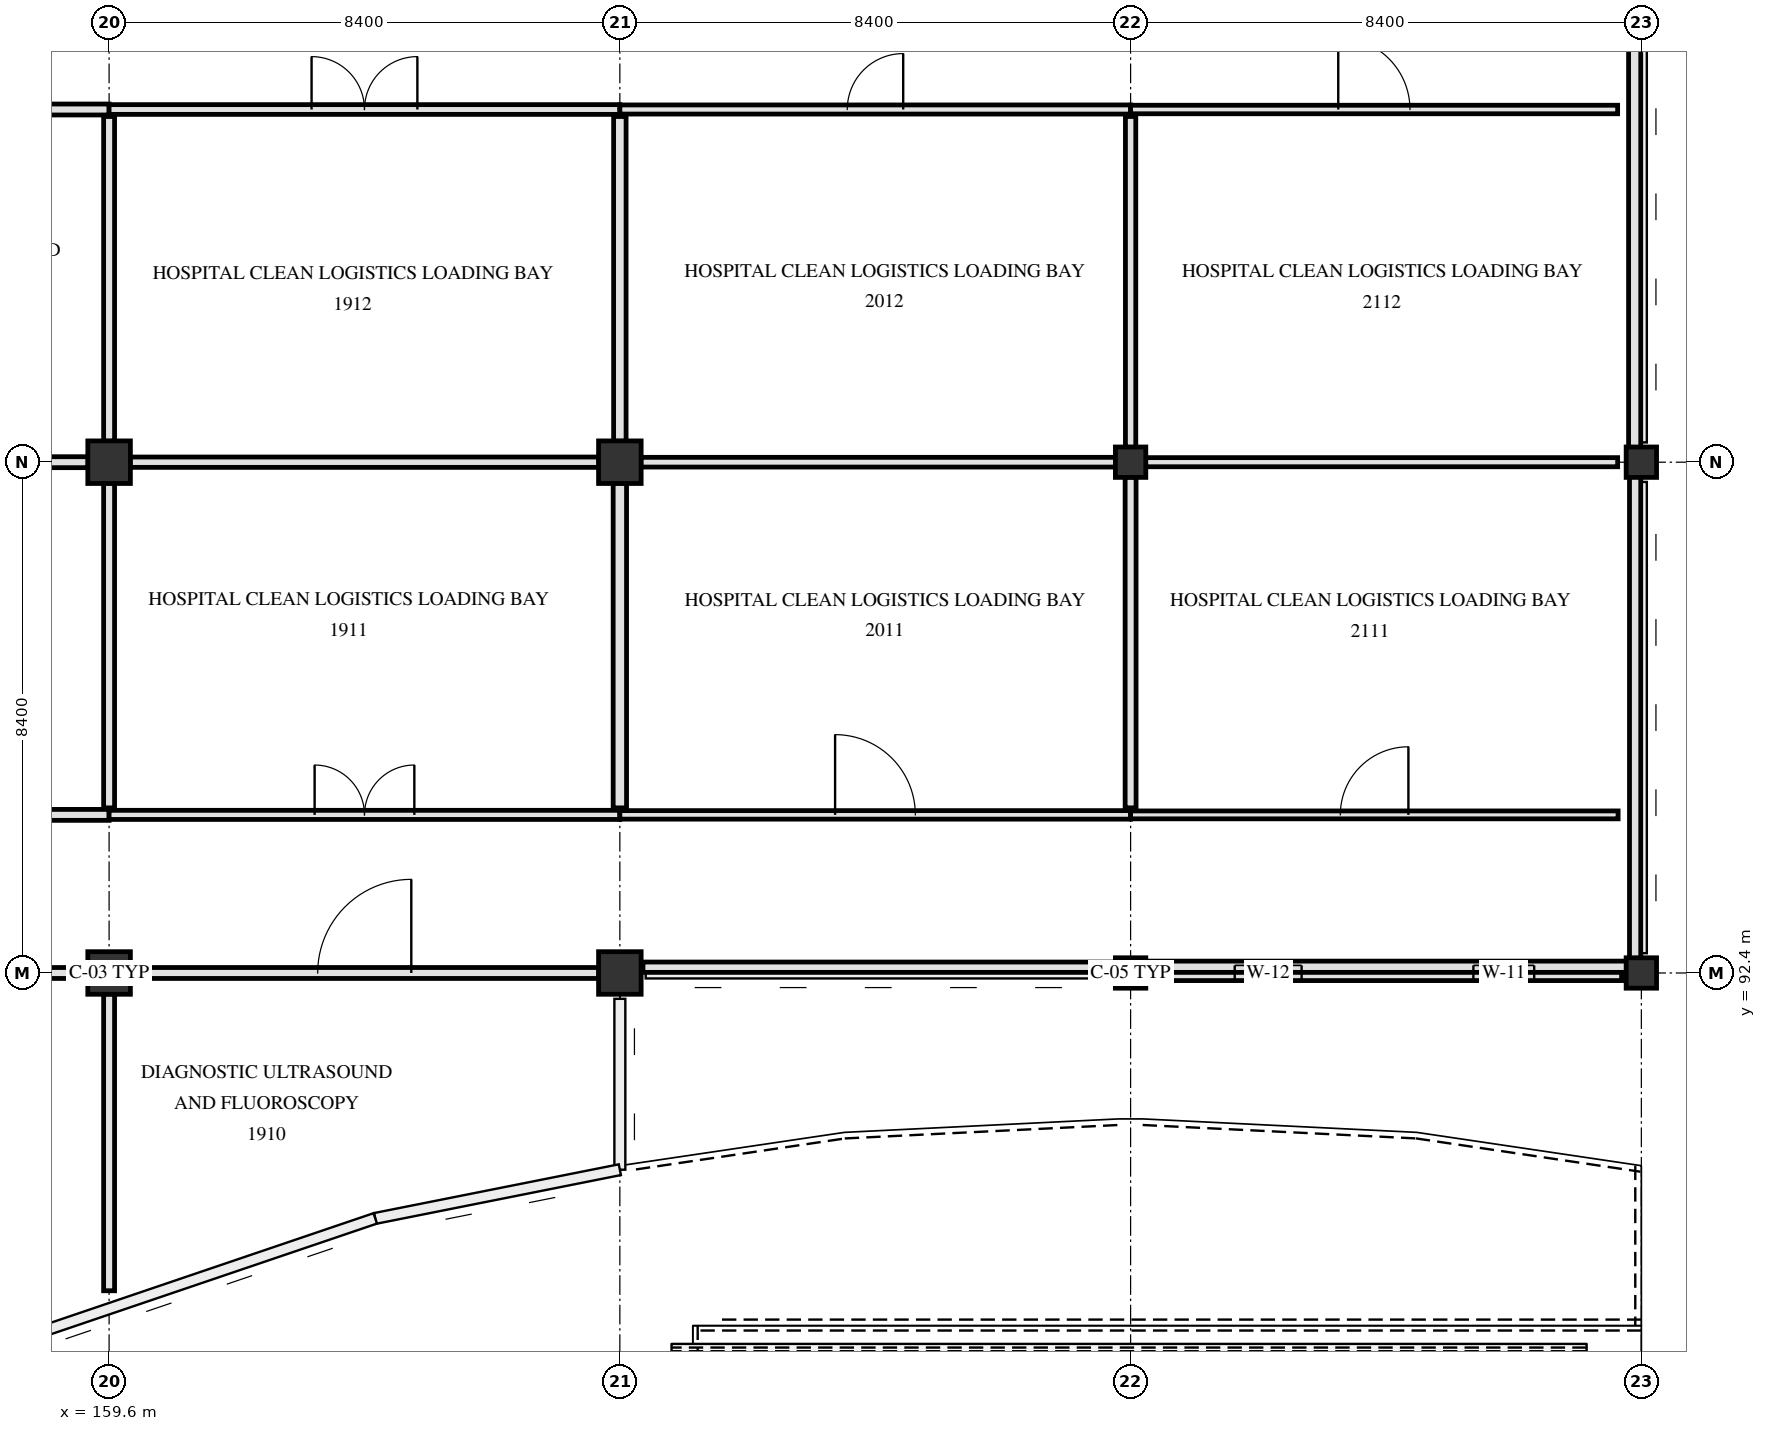
"""IFC4 building model, lengths in metres.
Left out: names, types, materials, properties, quantities, classifications, styles, units other than length and angle.
Written with IfcOpenShell. Run it as: python <this file> out.ifc"""

import sys

from ifc_helpers import new_model, si_unit, direction, frame, frame_2d, origin, origin_2d, place, context, subcontext, project, spatial, rectangle, extrude, element, fill, save


model = new_model("IFC4")
c1 = context("Model", 3, precision=1e-05, world=origin(), true_north=direction((0.0, 1.0)))
c2 = subcontext(c1, "Body", "Model", "MODEL_VIEW")
j1 = project(units=[si_unit("LENGTHUNIT", "METRE"), si_unit("PLANEANGLEUNIT", "RADIAN")], contexts=[c1])
p1 = place(None, origin())
s1 = spatial("IfcSite", under=j1, at=p1, CompositionType="ELEMENT")
p2 = place(p1, origin())
s2 = spatial("IfcBuilding", under=s1, at=p2, CompositionType="ELEMENT")
p3 = place(p2, origin())
s3 = spatial("IfcBuildingStorey", under=s2, at=p3, CompositionType="ELEMENT", Elevation=0.0)
for number, where, z_axis, x_axis in (
    (1, (159.6, 92.4, 0.0), (0.0, 0.0, 1.0), (1.0, 0.0, 0.0)),
    (2, (159.6, 100.8, 0.0), (0.0, 0.0, 1.0), (1.0, 0.0, 0.0)),
    (3, (168.0, 92.4, 0.0), (0.0, 0.0, 1.0), (1.0, 0.0, 0.0)),
    (4, (168.0, 100.8, 0.0), (0.0, 0.0, 1.0), (1.0, 0.0, 0.0)),
):
    element("IfcColumn", number, at=place(p3, frame(where, z_axis=z_axis, x_axis=x_axis)), inside=s3, PredefinedType="COLUMN", context=c2, shape_type="SweptSolid", body=[
        extrude(rectangle(XDim=0.7, YDim=0.7, at=origin_2d()), origin(), (0.0, 0.0, 1.0), 4.8),
    ])
for number, where, z_axis, x_axis in (
    (5, (176.4, 92.4, 0.0), (0.0, 0.0, 1.0), (1.0, 0.0, 0.0)),
    (6, (176.4, 100.8, 0.0), (0.0, 0.0, 1.0), (1.0, 0.0, 0.0)),
    (7, (184.8, 92.4, 0.0), (0.0, 0.0, 1.0), (1.0, 0.0, 0.0)),
    (8, (184.8, 100.8, 0.0), (0.0, 0.0, 1.0), (1.0, 0.0, 0.0)),
):
    element("IfcColumn", number, at=place(p3, frame(where, z_axis=z_axis, x_axis=x_axis)), inside=s3, PredefinedType="COLUMN", context=c2, shape_type="SweptSolid", body=[
        extrude(rectangle(XDim=0.5, YDim=0.5, at=origin_2d()), origin(), (0.0, 0.0, 1.0), 4.8),
    ])
p4 = place(p3, frame((184.475, 92.4, 0.0), z_axis=(0.0, 0.0, 1.0), x_axis=(-1.0, 0.0, 0.0)))
e9 = element("IfcWall", 9, at=p4, inside=s3, PredefinedType="SOLIDWALL", context=c2, shape_type="SweptSolid", body=[
    extrude(rectangle(XDim=7.75, YDim=0.25, at=frame_2d((3.875, 0.0))), origin(), (0.0, 0.0, 1.0), 3.79),
])
p5 = place(p4, frame((1.438, 0.0, 0.85)))
e10 = element("IfcOpeningElement", 10, at=p5, cuts=e9, PredefinedType="OPENING", context=c2, shape_type="SweptSolid", body=[
    extrude(rectangle(XDim=1.0, YDim=1.42, at=frame_2d((0.5, 0.71))), frame((0.0, 0.135, 0.0), z_axis=(0.0, -1.0, 0.0), x_axis=(1.0, 0.0, 0.0)), (0.0, 0.0, 1.0), 0.27),
])
p6 = place(p4, frame((5.262, 0.0, 0.85)))
e11 = element("IfcOpeningElement", 11, at=p6, cuts=e9, PredefinedType="OPENING", context=c2, shape_type="SweptSolid", body=[
    extrude(rectangle(XDim=1.1, YDim=1.42, at=frame_2d((0.55, 0.71))), frame((0.0, 0.135, 0.0), z_axis=(0.0, -1.0, 0.0), x_axis=(1.0, 0.0, 0.0)), (0.0, 0.0, 1.0), 0.27),
])
p7 = place(p3, frame((184.8, 92.502, 4.78), z_axis=(0.0, 0.0, 1.0), x_axis=(-1.0, 0.0, 0.0)))
e12 = element("IfcWall", 12, at=p7, inside=s3, PredefinedType="PARAPET", context=c2, shape_type="SweptSolid", body=[
    extrude(rectangle(XDim=8.4, YDim=0.185, at=frame_2d((4.2, 0.0))), origin(), (0.0, 0.0, 1.0), 1.17),
])
p8 = place(p3, frame((176.4, 92.495, 4.78), z_axis=(0.0, 0.0, 1.0), x_axis=(-1.0, 0.0, 0.0)))
e13 = element("IfcWall", 13, at=p8, inside=s3, PredefinedType="PARAPET", context=c2, shape_type="SweptSolid", body=[
    extrude(rectangle(XDim=8.02, YDim=0.17, at=frame_2d((4.01, 0.0))), origin(), (0.0, 0.0, 1.0), 1.17),
])
p9 = place(p3, frame((184.69, 109.2, 4.78), z_axis=(0.0, 0.0, 1.0), x_axis=(0.0, -1.0, 0.0)))
e14 = element("IfcWall", 14, at=p9, inside=s3, PredefinedType="PARAPET", context=c2, shape_type="SweptSolid", body=[
    extrude(rectangle(XDim=8.4, YDim=0.2, at=frame_2d((4.2, 0.0))), origin(), (0.0, 0.0, 1.0), 1.17),
])
p10 = place(p3, frame((184.698, 100.8, 4.78), z_axis=(0.0, 0.0, 1.0), x_axis=(0.0, -1.0, 0.0)))
e15 = element("IfcWall", 15, at=p10, inside=s3, PredefinedType="PARAPET", context=c2, shape_type="SweptSolid", body=[
    extrude(rectangle(XDim=8.4, YDim=0.185, at=frame_2d((4.2, 0.0))), origin(), (0.0, 0.0, 1.0), 1.17),
])
p11 = place(p3, frame((151.595, 92.4, 0.0), z_axis=(0.0, 0.0, 1.0), x_axis=(1.0, 0.0, 0.0)))
e16 = element("IfcWall", 16, at=p11, inside=s3, PredefinedType="PARTITIONING", context=c2, shape_type="SweptSolid", body=[
    extrude(rectangle(XDim=7.66, YDim=0.18, at=frame_2d((3.83, 0.0))), origin(), (0.0, 0.0, 1.0), 3.84),
])
p12 = place(p11, frame((3.355, 0.0, 0.0)))
e17 = element("IfcOpeningElement", 17, at=p12, cuts=e16, PredefinedType="OPENING", context=c2, shape_type="SweptSolid", body=[
    extrude(rectangle(XDim=0.95, YDim=2.1, at=frame_2d((0.475, 1.05))), frame((0.0, 0.1, 0.0), z_axis=(0.0, -1.0, 0.0), x_axis=(1.0, 0.0, 0.0)), (0.0, 0.0, 1.0), 0.2),
])
p13 = place(p3, frame((159.945, 92.4, 0.0), z_axis=(0.0, 0.0, 1.0), x_axis=(1.0, 0.0, 0.0)))
e18 = element("IfcWall", 18, at=p13, inside=s3, PredefinedType="PARTITIONING", context=c2, shape_type="SweptSolid", body=[
    extrude(rectangle(XDim=7.71, YDim=0.18, at=frame_2d((3.855, 0.0))), origin(), (0.0, 0.0, 1.0), 3.84),
])
p14 = place(p13, frame((3.085, 0.0, 0.0)))
e19 = element("IfcOpeningElement", 19, at=p14, cuts=e18, PredefinedType="OPENING", context=c2, shape_type="SweptSolid", body=[
    extrude(rectangle(XDim=1.54, YDim=2.24, at=frame_2d((0.77, 1.12))), frame((0.0, 0.1, 0.0), z_axis=(0.0, -1.0, 0.0), x_axis=(1.0, 0.0, 0.0)), (0.0, 0.0, 1.0), 0.2),
])
p15 = place(p3, frame((151.2, 95.0, 0.0), z_axis=(0.0, 0.0, 1.0), x_axis=(1.0, 0.0, 0.0)))
e20 = element("IfcWall", 20, at=p15, inside=s3, PredefinedType="PARTITIONING", context=c2, shape_type="SweptSolid", body=[
    extrude(rectangle(XDim=8.4, YDim=0.18, at=frame_2d((4.2, 0.0))), origin(), (0.0, 0.0, 1.0), 3.89),
])
p16 = place(p15, frame((3.65, 0.0, 0.0)))
e21 = element("IfcOpeningElement", 21, at=p16, cuts=e20, PredefinedType="OPENING", context=c2, shape_type="SweptSolid", body=[
    extrude(rectangle(XDim=1.1, YDim=2.15, at=frame_2d((0.55, 1.075))), frame((0.0, 0.1, 0.0), z_axis=(0.0, -1.0, 0.0), x_axis=(1.0, 0.0, 0.0)), (0.0, 0.0, 1.0), 0.2),
])
p17 = place(p3, frame((159.6, 95.0, 0.0), z_axis=(0.0, 0.0, 1.0), x_axis=(1.0, 0.0, 0.0)))
e22 = element("IfcWall", 22, at=p17, inside=s3, PredefinedType="PARTITIONING", context=c2, shape_type="SweptSolid", body=[
    extrude(rectangle(XDim=8.4, YDim=0.15, at=frame_2d((4.2, 0.0))), origin(), (0.0, 0.0, 1.0), 3.89),
])
p18 = place(p17, frame((3.38, 0.0, 0.0)))
e23 = element("IfcOpeningElement", 23, at=p18, cuts=e22, PredefinedType="OPENING", context=c2, shape_type="SweptSolid", body=[
    extrude(rectangle(XDim=1.64, YDim=2.28, at=frame_2d((0.82, 1.14))), frame((0.0, 0.085, 0.0), z_axis=(0.0, -1.0, 0.0), x_axis=(1.0, 0.0, 0.0)), (0.0, 0.0, 1.0), 0.17),
])
p19 = place(p3, frame((168.0, 95.0, 0.0), z_axis=(0.0, 0.0, 1.0), x_axis=(1.0, 0.0, 0.0)))
e24 = element("IfcWall", 24, at=p19, inside=s3, PredefinedType="PARTITIONING", context=c2, shape_type="SweptSolid", body=[
    extrude(rectangle(XDim=8.4, YDim=0.14, at=frame_2d((4.2, 0.0))), origin(), (0.0, 0.0, 1.0), 3.89),
])
p20 = place(p19, frame((3.54, 0.0, 0.0)))
e25 = element("IfcOpeningElement", 25, at=p20, cuts=e24, PredefinedType="OPENING", context=c2, shape_type="SweptSolid", body=[
    extrude(rectangle(XDim=1.32, YDim=2.18, at=frame_2d((0.66, 1.09))), frame((0.0, 0.08, 0.0), z_axis=(0.0, -1.0, 0.0), x_axis=(1.0, 0.0, 0.0)), (0.0, 0.0, 1.0), 0.16),
])
p21 = place(p3, frame((176.4, 95.0, 0.0), z_axis=(0.0, 0.0, 1.0), x_axis=(1.0, 0.0, 0.0)))
e26 = element("IfcWall", 26, at=p21, inside=s3, PredefinedType="PARTITIONING", context=c2, shape_type="SweptSolid", body=[
    extrude(rectangle(XDim=8.018, YDim=0.13, at=frame_2d((4.009, 0.0))), origin(), (0.0, 0.0, 1.0), 3.89),
])
p22 = place(p21, frame((3.449, 0.0, 0.0)))
e27 = element("IfcOpeningElement", 27, at=p22, cuts=e26, PredefinedType="OPENING", context=c2, shape_type="SweptSolid", body=[
    extrude(rectangle(XDim=1.12, YDim=2.18, at=frame_2d((0.56, 1.09))), frame((0.0, 0.075, 0.0), z_axis=(0.0, -1.0, 0.0), x_axis=(1.0, 0.0, 0.0)), (0.0, 0.0, 1.0), 0.15),
])
p23 = place(p3, frame((151.595, 100.8, 0.0), z_axis=(0.0, 0.0, 1.0), x_axis=(1.0, 0.0, 0.0)))
e28 = element("IfcWall", 28, at=p23, inside=s3, PredefinedType="PARTITIONING", context=c2, shape_type="SweptSolid", body=[
    extrude(rectangle(XDim=7.66, YDim=0.18, at=frame_2d((3.83, 0.0))), origin(), (0.0, 0.0, 1.0), 3.84),
])
p24 = place(p3, frame((159.945, 100.8, 0.0), z_axis=(0.0, 0.0, 1.0), x_axis=(1.0, 0.0, 0.0)))
e29 = element("IfcWall", 29, at=p24, inside=s3, PredefinedType="PARTITIONING", context=c2, shape_type="SweptSolid", body=[
    extrude(rectangle(XDim=7.71, YDim=0.17, at=frame_2d((3.855, 0.0))), origin(), (0.0, 0.0, 1.0), 3.84),
])
p25 = place(p3, frame((168.345, 100.8, 0.0), z_axis=(0.0, 0.0, 1.0), x_axis=(1.0, 0.0, 0.0)))
e30 = element("IfcWall", 30, at=p25, inside=s3, PredefinedType="PARTITIONING", context=c2, shape_type="SweptSolid", body=[
    extrude(rectangle(XDim=7.81, YDim=0.16, at=frame_2d((3.905, 0.0))), origin(), (0.0, 0.0, 1.0), 3.84),
])
p26 = place(p3, frame((176.645, 100.8, 0.0), z_axis=(0.0, 0.0, 1.0), x_axis=(1.0, 0.0, 0.0)))
e31 = element("IfcWall", 31, at=p26, inside=s3, PredefinedType="PARTITIONING", context=c2, shape_type="SweptSolid", body=[
    extrude(rectangle(XDim=7.765, YDim=0.15, at=frame_2d((3.882, 0.0))), origin(), (0.0, 0.0, 1.0), 3.84),
])
p27 = place(p3, frame((151.2, 106.6, 0.0), z_axis=(0.0, 0.0, 1.0), x_axis=(1.0, 0.0, 0.0)))
e32 = element("IfcWall", 32, at=p27, inside=s3, PredefinedType="PARTITIONING", context=c2, shape_type="SweptSolid", body=[
    extrude(rectangle(XDim=8.4, YDim=0.18, at=frame_2d((4.2, 0.0))), origin(), (0.0, 0.0, 1.0), 3.89),
])
p28 = place(p27, frame((3.625, 0.0, 0.0)))
e33 = element("IfcOpeningElement", 33, at=p28, cuts=e32, PredefinedType="OPENING", context=c2, shape_type="SweptSolid", body=[
    extrude(rectangle(XDim=1.15, YDim=2.15, at=frame_2d((0.575, 1.075))), frame((0.0, 0.1, 0.0), z_axis=(0.0, -1.0, 0.0), x_axis=(1.0, 0.0, 0.0)), (0.0, 0.0, 1.0), 0.2),
])
p29 = place(p3, frame((159.6, 106.6, 0.0), z_axis=(0.0, 0.0, 1.0), x_axis=(1.0, 0.0, 0.0)))
e34 = element("IfcWall", 34, at=p29, inside=s3, PredefinedType="PARTITIONING", context=c2, shape_type="SweptSolid", body=[
    extrude(rectangle(XDim=8.4, YDim=0.16, at=frame_2d((4.2, 0.0))), origin(), (0.0, 0.0, 1.0), 3.89),
])
p30 = place(p29, frame((3.33, 0.0, 0.0)))
e35 = element("IfcOpeningElement", 35, at=p30, cuts=e34, PredefinedType="OPENING", context=c2, shape_type="SweptSolid", body=[
    extrude(rectangle(XDim=1.74, YDim=2.24, at=frame_2d((0.87, 1.12))), frame((0.0, 0.09, 0.0), z_axis=(0.0, -1.0, 0.0), x_axis=(1.0, 0.0, 0.0)), (0.0, 0.0, 1.0), 0.18),
])
p31 = place(p3, frame((168.0, 106.6, 0.0), z_axis=(0.0, 0.0, 1.0), x_axis=(1.0, 0.0, 0.0)))
e36 = element("IfcWall", 36, at=p31, inside=s3, PredefinedType="PARTITIONING", context=c2, shape_type="SweptSolid", body=[
    extrude(rectangle(XDim=8.4, YDim=0.15, at=frame_2d((4.2, 0.0))), origin(), (0.0, 0.0, 1.0), 3.89),
])
p32 = place(p31, frame((3.74, 0.0, 0.0)))
e37 = element("IfcOpeningElement", 37, at=p32, cuts=e36, PredefinedType="OPENING", context=c2, shape_type="SweptSolid", body=[
    extrude(rectangle(XDim=0.92, YDim=2.08, at=frame_2d((0.46, 1.04))), frame((0.0, 0.085, 0.0), z_axis=(0.0, -1.0, 0.0), x_axis=(1.0, 0.0, 0.0)), (0.0, 0.0, 1.0), 0.17),
])
p33 = place(p3, frame((176.4, 106.6, 0.0), z_axis=(0.0, 0.0, 1.0), x_axis=(1.0, 0.0, 0.0)))
e38 = element("IfcWall", 38, at=p33, inside=s3, PredefinedType="PARTITIONING", context=c2, shape_type="SweptSolid", body=[
    extrude(rectangle(XDim=8.01, YDim=0.14, at=frame_2d((4.005, 0.0))), origin(), (0.0, 0.0, 1.0), 3.89),
])
p34 = place(p33, frame((3.415, 0.0, 0.0)))
e39 = element("IfcOpeningElement", 39, at=p34, cuts=e38, PredefinedType="OPENING", context=c2, shape_type="SweptSolid", body=[
    extrude(rectangle(XDim=1.18, YDim=2.18, at=frame_2d((0.59, 1.09))), frame((0.0, 0.08, 0.0), z_axis=(0.0, -1.0, 0.0), x_axis=(1.0, 0.0, 0.0)), (0.0, 0.0, 1.0), 0.16),
])
p35 = place(p3, frame((159.6, 87.174, 0.0), z_axis=(0.0, 0.0, 1.0), x_axis=(0.0, 1.0, 0.0)))
e40 = element("IfcWall", 40, at=p35, inside=s3, PredefinedType="PARTITIONING", context=c2, shape_type="SweptSolid", body=[
    extrude(rectangle(XDim=4.881, YDim=0.18, at=frame_2d((2.44, 0.0))), origin(), (0.0, 0.0, 1.0), 4.49),
])
for number, where, z_axis, x_axis in (
    (41, (159.6, 95.115, 0.0), (0.0, 0.0, 1.0), (0.0, 1.0, 0.0)),
    (42, (159.6, 101.145, 0.0), (0.0, 0.0, 1.0), (0.0, 1.0, 0.0)),
):
    element("IfcWall", number, at=place(p3, frame(where, z_axis=z_axis, x_axis=x_axis)), inside=s3, PredefinedType="PARTITIONING", context=c2, shape_type="SweptSolid", body=[
        extrude(rectangle(XDim=5.34, YDim=0.18, at=frame_2d((2.67, 0.0))), origin(), (0.0, 0.0, 1.0), 3.89),
    ])
p36 = place(p3, frame((168.0, 95.115, 0.0), z_axis=(0.0, 0.0, 1.0), x_axis=(0.0, 1.0, 0.0)))
e43 = element("IfcWall", 43, at=p36, inside=s3, PredefinedType="PARTITIONING", context=c2, shape_type="SweptSolid", body=[
    extrude(rectangle(XDim=5.34, YDim=0.22, at=frame_2d((2.67, 0.0))), origin(), (0.0, 0.0, 1.0), 3.89),
])
p37 = place(p3, frame((168.0, 101.145, 0.0), z_axis=(0.0, 0.0, 1.0), x_axis=(0.0, 1.0, 0.0)))
e44 = element("IfcWall", 44, at=p37, inside=s3, PredefinedType="PARTITIONING", context=c2, shape_type="SweptSolid", body=[
    extrude(rectangle(XDim=5.34, YDim=0.205, at=frame_2d((2.67, 0.0))), origin(), (0.0, 0.0, 1.0), 3.89),
])
p38 = place(p3, frame((176.4, 95.115, 0.0), z_axis=(0.0, 0.0, 1.0), x_axis=(0.0, 1.0, 0.0)))
e45 = element("IfcWall", 45, at=p38, inside=s3, PredefinedType="PARTITIONING", context=c2, shape_type="SweptSolid", body=[
    extrude(rectangle(XDim=5.44, YDim=0.18, at=frame_2d((2.72, 0.0))), origin(), (0.0, 0.0, 1.0), 3.89),
])
p39 = place(p3, frame((176.4, 101.045, 0.0), z_axis=(0.0, 0.0, 1.0), x_axis=(0.0, 1.0, 0.0)))
e46 = element("IfcWall", 46, at=p39, inside=s3, PredefinedType="PARTITIONING", context=c2, shape_type="SweptSolid", body=[
    extrude(rectangle(XDim=5.44, YDim=0.17, at=frame_2d((2.72, 0.0))), origin(), (0.0, 0.0, 1.0), 3.89),
])
p40 = place(p5, origin())
e47 = element("IfcWindow", 47, at=p40, inside=s3, PartitioningType="SINGLE_PANEL", PredefinedType="WINDOW", context=c2, shape_type="SweptSolid", body=[
    extrude(rectangle(XDim=1.0, YDim=1.42, at=frame_2d((0.5, 0.71))), frame((0.0, 0.03, 0.0), z_axis=(0.0, -1.0, 0.0), x_axis=(1.0, 0.0, 0.0)), (0.0, 0.0, 1.0), 0.06),
])
fill(e10, e47)
p41 = place(p6, origin())
e48 = element("IfcWindow", 48, at=p41, inside=s3, PartitioningType="SINGLE_PANEL", PredefinedType="WINDOW", context=c2, shape_type="SweptSolid", body=[
    extrude(rectangle(XDim=1.1, YDim=1.42, at=frame_2d((0.55, 0.71))), frame((0.0, 0.03, 0.0), z_axis=(0.0, -1.0, 0.0), x_axis=(1.0, 0.0, 0.0)), (0.0, 0.0, 1.0), 0.06),
])
fill(e11, e48)
p42 = place(p14, origin())
e49 = element("IfcDoor", 49, at=p42, inside=s3, OperationType="SINGLE_SWING_RIGHT", PredefinedType="DOOR", context=c2, shape_type="SweptSolid", body=[
    extrude(rectangle(XDim=1.54, YDim=2.24, at=frame_2d((0.77, 1.12))), frame((0.0, 0.025, 0.0), z_axis=(0.0, -1.0, 0.0), x_axis=(1.0, 0.0, 0.0)), (0.0, 0.0, 1.0), 0.05),
])
fill(e19, e49)
p43 = place(p18, origin())
e50 = element("IfcDoor", 50, at=p43, inside=s3, OperationType="DOUBLE_SWING_LEFT", PredefinedType="DOOR", context=c2, shape_type="SweptSolid", body=[
    extrude(rectangle(XDim=1.64, YDim=2.28, at=frame_2d((0.82, 1.14))), frame((0.0, 0.025, 0.0), z_axis=(0.0, -1.0, 0.0), x_axis=(1.0, 0.0, 0.0)), (0.0, 0.0, 1.0), 0.05),
])
fill(e23, e50)
p44 = place(p30, origin())
e51 = element("IfcDoor", 51, at=p44, inside=s3, OperationType="DOUBLE_SWING_RIGHT", PredefinedType="DOOR", context=c2, shape_type="SweptSolid", body=[
    extrude(rectangle(XDim=1.74, YDim=2.24, at=frame_2d((0.87, 1.12))), frame((0.0, 0.025, 0.0), z_axis=(0.0, -1.0, 0.0), x_axis=(1.0, 0.0, 0.0)), (0.0, 0.0, 1.0), 0.05),
])
fill(e35, e51)
p45 = place(p20, origin())
e52 = element("IfcDoor", 52, at=p45, inside=s3, OperationType="SINGLE_SWING_LEFT", PredefinedType="DOOR", context=c2, shape_type="SweptSolid", body=[
    extrude(rectangle(XDim=1.32, YDim=2.18, at=frame_2d((0.66, 1.09))), frame((0.0, 0.025, 0.0), z_axis=(0.0, -1.0, 0.0), x_axis=(1.0, 0.0, 0.0)), (0.0, 0.0, 1.0), 0.05),
])
fill(e25, e52)
p46 = place(p32, origin())
e53 = element("IfcDoor", 53, at=p46, inside=s3, OperationType="SINGLE_SWING_RIGHT", PredefinedType="DOOR", context=c2, shape_type="SweptSolid", body=[
    extrude(rectangle(XDim=0.92, YDim=2.08, at=frame_2d((0.46, 1.04))), frame((0.0, 0.025, 0.0), z_axis=(0.0, -1.0, 0.0), x_axis=(1.0, 0.0, 0.0)), (0.0, 0.0, 1.0), 0.05),
])
fill(e37, e53)
p47 = place(p22, origin())
e54 = element("IfcDoor", 54, at=p47, inside=s3, OperationType="SINGLE_SWING_RIGHT", PredefinedType="DOOR", context=c2, shape_type="SweptSolid", body=[
    extrude(rectangle(XDim=1.12, YDim=2.18, at=frame_2d((0.56, 1.09))), frame((0.0, 0.025, 0.0), z_axis=(0.0, -1.0, 0.0), x_axis=(1.0, 0.0, 0.0)), (0.0, 0.0, 1.0), 0.05),
])
fill(e27, e54)
p48 = place(p34, origin())
e55 = element("IfcDoor", 55, at=p48, inside=s3, OperationType="SINGLE_SWING_LEFT", PredefinedType="DOOR", context=c2, shape_type="SweptSolid", body=[
    extrude(rectangle(XDim=1.18, YDim=2.18, at=frame_2d((0.59, 1.09))), frame((0.0, 0.025, 0.0), z_axis=(0.0, -1.0, 0.0), x_axis=(1.0, 0.0, 0.0)), (0.0, 0.0, 1.0), 0.05),
])
fill(e39, e55)
save(model, sys.argv[1])
